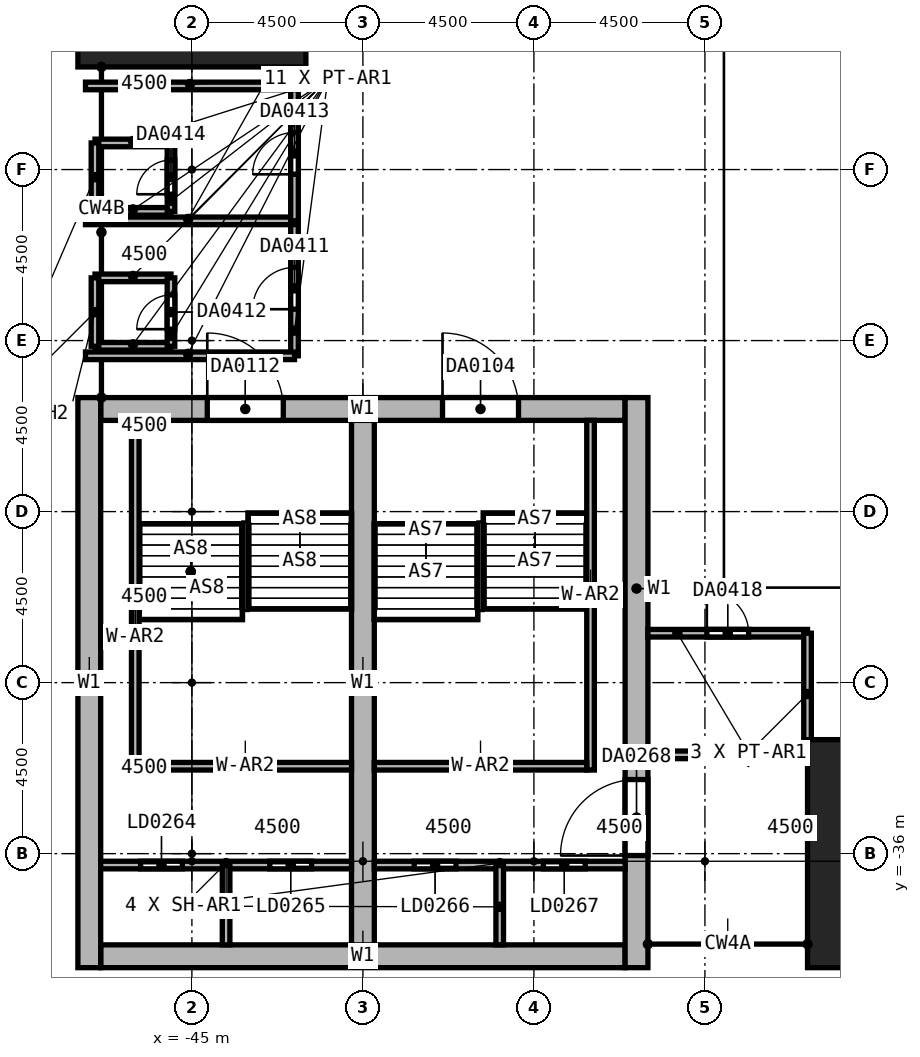
"""IFC4 building model, lengths in metres.
Left out: names, types, materials, properties, quantities, classifications, styles, units other than length and angle.
Written with IfcOpenShell. Run it as: python <this file> out.ifc"""

import sys

from ifc_helpers import new_model, si_unit, direction, frame, frame_2d, origin, origin_2d, place, context, subcontext, project, spatial, rectangle, extrude, element, fill, save


model = new_model("IFC4")
c1 = context("Model", 3, precision=1e-05, world=origin(), true_north=direction((0.0, 1.0)))
c2 = subcontext(c1, "Body", "Model", "MODEL_VIEW")
j1 = project(units=[si_unit("LENGTHUNIT", "METRE"), si_unit("PLANEANGLEUNIT", "RADIAN")], contexts=[c1])
p1 = place(None, origin())
s1 = spatial("IfcSite", under=j1, at=p1, CompositionType="ELEMENT")
p2 = place(p1, origin())
s2 = spatial("IfcBuilding", under=s1, at=p2, CompositionType="ELEMENT")
p3 = place(p2, frame((0.0, 0.0, 25.0)))
s3 = spatial("IfcBuildingStorey", under=s2, at=p3, CompositionType="ELEMENT", Elevation=25.0)
for number, where, z_axis, x_axis in (
    (1, (-27.0, -36.0, 0.0), (0.0, 0.0, 1.0), (1.0, 0.0, 0.0)),
    (2, (-45.0, -13.5, 0.0), (0.0, 0.0, 1.0), (0.0, 1.0, 0.0)),
):
    element("IfcColumn", number, at=place(p3, frame(where, z_axis=z_axis, x_axis=x_axis)), inside=s3, PredefinedType="COLUMN", context=c2, shape_type="SweptSolid", body=[
        extrude(rectangle(XDim=3.6, YDim=6.0, at=origin_2d()), origin(), (0.0, 0.0, 1.0), 6.0),
    ])
p4 = place(p3, frame((-47.4, -24.3, 0.0), z_axis=(0.0, 0.0, 1.0), x_axis=(1.0, 0.0, 0.0)))
e3 = element("IfcWall", 3, at=p4, inside=s3, PredefinedType="SHEAR", context=c2, shape_type="SweptSolid", body=[
    extrude(rectangle(XDim=13.8, YDim=0.6, at=frame_2d((6.9, 0.0))), origin(), (0.0, 0.0, 1.0), 6.0),
])
p5 = place(p4, frame((8.995, 0.0, 0.0)))
e4 = element("IfcOpeningElement", 4, at=p5, cuts=e3, PredefinedType="OPENING", context=c2, shape_type="SweptSolid", body=[
    extrude(rectangle(XDim=2.0, YDim=2.4, at=frame_2d((1.0, 1.2))), frame((0.0, 0.3, 0.0), z_axis=(0.0, -1.0, 0.0), x_axis=(1.0, 0.0, 0.0)), (0.0, 0.0, 1.0), 0.6),
])
p6 = place(p4, frame((2.805, 0.0, 0.0)))
e5 = element("IfcOpeningElement", 5, at=p6, cuts=e3, PredefinedType="OPENING", context=c2, shape_type="SweptSolid", body=[
    extrude(rectangle(XDim=2.0, YDim=2.4, at=frame_2d((1.0, 1.2))), frame((0.0, 0.3, 0.0), z_axis=(0.0, -1.0, 0.0), x_axis=(1.0, 0.0, 0.0)), (0.0, 0.0, 1.0), 0.6),
])
p7 = place(p3, frame((-47.4, -38.7, 0.0), z_axis=(0.0, 0.0, 1.0), x_axis=(1.0, 0.0, 0.0)))
e6 = element("IfcWall", 6, at=p7, inside=s3, PredefinedType="SHEAR", context=c2, shape_type="SweptSolid", body=[
    extrude(rectangle(XDim=13.8, YDim=0.6, at=frame_2d((6.9, 0.0))), origin(), (0.0, 0.0, 1.0), 6.0),
])
p8 = place(p3, frame((-47.7, -39.0, 0.0), z_axis=(0.0, 0.0, 1.0), x_axis=(0.0, 1.0, 0.0)))
e7 = element("IfcWall", 7, at=p8, inside=s3, PredefinedType="SHEAR", context=c2, shape_type="SweptSolid", body=[
    extrude(rectangle(XDim=15.0, YDim=0.6, at=frame_2d((7.5, 0.0))), origin(), (0.0, 0.0, 1.0), 6.0),
])
p9 = place(p3, frame((-33.3, -39.0, 0.0), z_axis=(0.0, 0.0, 1.0), x_axis=(0.0, 1.0, 0.0)))
e8 = element("IfcWall", 8, at=p9, inside=s3, PredefinedType="SHEAR", context=c2, shape_type="SweptSolid", body=[
    extrude(rectangle(XDim=15.0, YDim=0.6, at=frame_2d((7.5, 0.0))), origin(), (0.0, 0.0, 1.0), 6.0),
])
p10 = place(p9, frame((2.95, 0.0, 0.0)))
e9 = element("IfcOpeningElement", 9, at=p10, cuts=e8, PredefinedType="OPENING", context=c2, shape_type="SweptSolid", body=[
    extrude(rectangle(XDim=2.0, YDim=2.4, at=frame_2d((1.0, 1.2))), frame((0.0, 0.3, 0.0), z_axis=(0.0, -1.0, 0.0), x_axis=(1.0, 0.0, 0.0)), (0.0, 0.0, 1.0), 0.6),
])
p11 = place(p3, frame((-40.5, -38.4, 0.0), z_axis=(0.0, 0.0, 1.0), x_axis=(0.0, 1.0, 0.0)))
e10 = element("IfcWall", 10, at=p11, inside=s3, PredefinedType="SHEAR", context=c2, shape_type="SweptSolid", body=[
    extrude(rectangle(XDim=13.8, YDim=0.6, at=frame_2d((6.9, 0.0))), origin(), (0.0, 0.0, 1.0), 6.0),
])
p12 = place(p3, frame((-34.51, -33.8, 0.0), z_axis=(0.0, 0.0, 1.0), x_axis=(0.0, 1.0, 0.0)))
e11 = element("IfcWall", 11, at=p12, inside=s3, PredefinedType="SOLIDWALL", context=c2, shape_type="SweptSolid", body=[
    extrude(rectangle(XDim=9.2, YDim=0.2, at=frame_2d((4.6, 0.0))), origin(), (0.0, 0.0, 1.0), 6.0),
])
p13 = place(p3, frame((-40.2, -33.7, 0.0), z_axis=(0.0, 0.0, 1.0), x_axis=(1.0, 0.0, 0.0)))
e12 = element("IfcWall", 12, at=p13, inside=s3, PredefinedType="SOLIDWALL", context=c2, shape_type="SweptSolid", body=[
    extrude(rectangle(XDim=5.59, YDim=0.2, at=frame_2d((2.795, 0.0))), origin(), (0.0, 0.0, 1.0), 6.0),
])
p14 = place(p3, frame((-46.49, -33.8, 0.0), z_axis=(0.0, 0.0, 1.0), x_axis=(0.0, 1.0, 0.0)))
e13 = element("IfcWall", 13, at=p14, inside=s3, PredefinedType="SOLIDWALL", context=c2, shape_type="SweptSolid", body=[
    extrude(rectangle(XDim=9.2, YDim=0.2, at=frame_2d((4.6, 0.0))), origin(), (0.0, 0.0, 1.0), 6.0),
])
p15 = place(p3, frame((-46.39, -33.7, 0.0), z_axis=(0.0, 0.0, 1.0), x_axis=(1.0, 0.0, 0.0)))
e14 = element("IfcWall", 14, at=p15, inside=s3, PredefinedType="SOLIDWALL", context=c2, shape_type="SweptSolid", body=[
    extrude(rectangle(XDim=5.59, YDim=0.2, at=frame_2d((2.795, 0.0))), origin(), (0.0, 0.0, 1.0), 6.0),
])
p16 = place(p3, frame((-47.4, -36.3, 0.0), z_axis=(0.0, 0.0, 1.0), x_axis=(1.0, 0.0, 0.0)))
e15 = element("IfcWall", 15, at=p16, inside=s3, PredefinedType="SHEAR", context=c2, shape_type="SweptSolid", body=[
    extrude(rectangle(XDim=6.6, YDim=0.2, at=frame_2d((3.3, 0.0))), origin(), (0.0, 0.0, 1.0), 6.0),
])
p17 = place(p16, frame((1.05, 0.0, 0.0)))
e16 = element("IfcOpeningElement", 16, at=p17, cuts=e15, PredefinedType="OPENING", context=c2, shape_type="SweptSolid", body=[
    extrude(rectangle(XDim=1.1, YDim=2.4, at=frame_2d((0.55, 1.2))), frame((0.0, 0.1, 0.0), z_axis=(0.0, -1.0, 0.0), x_axis=(1.0, 0.0, 0.0)), (0.0, 0.0, 1.0), 0.2),
])
p18 = place(p16, frame((4.45, 0.0, 0.0)))
e17 = element("IfcOpeningElement", 17, at=p18, cuts=e15, PredefinedType="OPENING", context=c2, shape_type="SweptSolid", body=[
    extrude(rectangle(XDim=1.1, YDim=2.4, at=frame_2d((0.55, 1.2))), frame((0.0, 0.1, 0.0), z_axis=(0.0, -1.0, 0.0), x_axis=(1.0, 0.0, 0.0)), (0.0, 0.0, 1.0), 0.2),
])
p19 = place(p3, frame((-40.2, -36.3, 0.0), z_axis=(0.0, 0.0, 1.0), x_axis=(1.0, 0.0, 0.0)))
e18 = element("IfcWall", 18, at=p19, inside=s3, PredefinedType="SHEAR", context=c2, shape_type="SweptSolid", body=[
    extrude(rectangle(XDim=6.6, YDim=0.2, at=frame_2d((3.3, 0.0))), origin(), (0.0, 0.0, 1.0), 6.0),
])
p20 = place(p19, frame((1.05, 0.0, 0.0)))
e19 = element("IfcOpeningElement", 19, at=p20, cuts=e18, PredefinedType="OPENING", context=c2, shape_type="SweptSolid", body=[
    extrude(rectangle(XDim=1.1, YDim=2.4, at=frame_2d((0.55, 1.2))), frame((0.0, 0.1, 0.0), z_axis=(0.0, -1.0, 0.0), x_axis=(1.0, 0.0, 0.0)), (0.0, 0.0, 1.0), 0.2),
])
p21 = place(p19, frame((4.45, 0.0, 0.0)))
e20 = element("IfcOpeningElement", 20, at=p21, cuts=e18, PredefinedType="OPENING", context=c2, shape_type="SweptSolid", body=[
    extrude(rectangle(XDim=1.1, YDim=2.4, at=frame_2d((0.55, 1.2))), frame((0.0, 0.1, 0.0), z_axis=(0.0, -1.0, 0.0), x_axis=(1.0, 0.0, 0.0)), (0.0, 0.0, 1.0), 0.2),
])
for number, where, z_axis, x_axis in (
    (21, (-36.9, -38.4, 0.0), (0.0, 0.0, 1.0), (0.0, 1.0, 0.0)),
    (22, (-44.1, -38.4, 0.0), (0.0, 0.0, 1.0), (0.0, 1.0, 0.0)),
):
    element("IfcWall", number, at=place(p3, frame(where, z_axis=z_axis, x_axis=x_axis)), inside=s3, PredefinedType="SHEAR", context=c2, shape_type="SweptSolid", body=[
        extrude(rectangle(XDim=2.1, YDim=0.2, at=frame_2d((1.05, 0.0))), origin(), (0.0, 0.0, 1.0), 6.0),
    ])
p22 = place(p3, frame((-42.3, -22.9, 0.0), z_axis=(0.0, 0.0, 1.0), x_axis=(0.0, 1.0, 0.0)))
e23 = element("IfcWall", 23, at=p22, inside=s3, PredefinedType="PARTITIONING", context=c2, shape_type="SweptSolid", body=[
    extrude(rectangle(XDim=3.55, YDim=0.2, at=frame_2d((1.775, 0.0))), origin(), (0.0, 0.0, 1.0), 5.7),
])
p23 = place(p22, frame((1.225, 0.0, 0.0)))
e24 = element("IfcOpeningElement", 24, at=p23, cuts=e23, PredefinedType="OPENING", context=c2, shape_type="SweptSolid", body=[
    extrude(rectangle(XDim=1.1, YDim=2.4, at=frame_2d((0.55, 1.2))), frame((0.0, 0.1, 0.0), z_axis=(0.0, -1.0, 0.0), x_axis=(1.0, 0.0, 0.0)), (0.0, 0.0, 1.0), 0.2),
])
for number, where, z_axis, x_axis in (
    (25, (-42.3, -22.9, 0.0), (0.0, 0.0, 1.0), (-1.0, 0.0, 0.0)),
    (26, (-47.8, -19.35, 0.0), (0.0, 0.0, 1.0), (1.0, 0.0, 0.0)),
):
    element("IfcWall", number, at=place(p3, frame(where, z_axis=z_axis, x_axis=x_axis)), inside=s3, PredefinedType="PARTITIONING", context=c2, shape_type="SweptSolid", body=[
        extrude(rectangle(XDim=5.5, YDim=0.2, at=frame_2d((2.75, 0.0))), origin(), (0.0, 0.0, 1.0), 5.7),
    ])
for number, where, z_axis, x_axis in (
    (27, (-47.55, -22.65, 0.0), (0.0, 0.0, 1.0), (1.0, 0.0, 0.0)),
    (28, (-45.55, -20.85, 0.0), (0.0, 0.0, 1.0), (-1.0, 0.0, 0.0)),
):
    element("IfcWall", number, at=place(p3, frame(where, z_axis=z_axis, x_axis=x_axis)), inside=s3, PredefinedType="PARTITIONING", context=c2, shape_type="SweptSolid", body=[
        extrude(rectangle(XDim=2.0, YDim=0.2, at=frame_2d((1.0, 0.0))), origin(), (0.0, 0.0, 1.0), 5.7),
    ])
p24 = place(p3, frame((-47.55, -22.65, 0.0), z_axis=(0.0, 0.0, 1.0), x_axis=(0.0, 1.0, 0.0)))
e29 = element("IfcWall", 29, at=p24, inside=s3, PredefinedType="PARTITIONING", context=c2, shape_type="SweptSolid", body=[
    extrude(rectangle(XDim=1.8, YDim=0.2, at=frame_2d((0.9, 0.0))), origin(), (0.0, 0.0, 1.0), 4.5),
])
p25 = place(p3, frame((-45.55, -22.65, 0.0), z_axis=(0.0, 0.0, 1.0), x_axis=(0.0, 1.0, 0.0)))
e30 = element("IfcWall", 30, at=p25, inside=s3, PredefinedType="PARTITIONING", context=c2, shape_type="SweptSolid", body=[
    extrude(rectangle(XDim=1.8, YDim=0.2, at=frame_2d((0.9, 0.0))), origin(), (0.0, 0.0, 1.0), 5.7),
])
p26 = place(p25, frame((0.45, 0.0, 0.0)))
e31 = element("IfcOpeningElement", 31, at=p26, cuts=e30, PredefinedType="OPENING", context=c2, shape_type="SweptSolid", body=[
    extrude(rectangle(XDim=0.9, YDim=2.1, at=frame_2d((0.45, 1.05))), frame((0.0, 0.1, 0.0), z_axis=(0.0, -1.0, 0.0), x_axis=(1.0, 0.0, 0.0)), (0.0, 0.0, 1.0), 0.2),
])
p27 = place(p3, frame((-42.3, -19.35, 0.0), z_axis=(0.0, 0.0, 1.0), x_axis=(0.0, 1.0, 0.0)))
e32 = element("IfcWall", 32, at=p27, inside=s3, PredefinedType="PARTITIONING", context=c2, shape_type="SweptSolid", body=[
    extrude(rectangle(XDim=3.55, YDim=0.2, at=frame_2d((1.775, 0.0))), origin(), (0.0, 0.0, 1.0), 5.7),
])
p28 = place(p27, frame((1.225, 0.0, 0.0)))
e33 = element("IfcOpeningElement", 33, at=p28, cuts=e32, PredefinedType="OPENING", context=c2, shape_type="SweptSolid", body=[
    extrude(rectangle(XDim=1.1, YDim=2.4, at=frame_2d((0.55, 1.2))), frame((0.0, 0.1, 0.0), z_axis=(0.0, -1.0, 0.0), x_axis=(1.0, 0.0, 0.0)), (0.0, 0.0, 1.0), 0.2),
])
p29 = place(p3, frame((-42.3, -15.8, 0.0), z_axis=(0.0, 0.0, 1.0), x_axis=(-1.0, 0.0, 0.0)))
e34 = element("IfcWall", 34, at=p29, inside=s3, PredefinedType="PARTITIONING", context=c2, shape_type="SweptSolid", body=[
    extrude(rectangle(XDim=5.5, YDim=0.2, at=frame_2d((2.75, 0.0))), origin(), (0.0, 0.0, 1.0), 5.7),
])
for number, where, z_axis, x_axis in (
    (35, (-47.55, -19.1, 0.0), (0.0, 0.0, 1.0), (1.0, 0.0, 0.0)),
    (36, (-45.55, -17.3, 0.0), (0.0, 0.0, 1.0), (-1.0, 0.0, 0.0)),
):
    element("IfcWall", number, at=place(p3, frame(where, z_axis=z_axis, x_axis=x_axis)), inside=s3, PredefinedType="PARTITIONING", context=c2, shape_type="SweptSolid", body=[
        extrude(rectangle(XDim=2.0, YDim=0.2, at=frame_2d((1.0, 0.0))), origin(), (0.0, 0.0, 1.0), 5.7),
    ])
p30 = place(p3, frame((-47.55, -19.1, 0.0), z_axis=(0.0, 0.0, 1.0), x_axis=(0.0, 1.0, 0.0)))
e37 = element("IfcWall", 37, at=p30, inside=s3, PredefinedType="PARTITIONING", context=c2, shape_type="SweptSolid", body=[
    extrude(rectangle(XDim=1.8, YDim=0.2, at=frame_2d((0.9, 0.0))), origin(), (0.0, 0.0, 1.0), 4.5),
])
p31 = place(p3, frame((-45.55, -19.1, 0.0), z_axis=(0.0, 0.0, 1.0), x_axis=(0.0, 1.0, 0.0)))
e38 = element("IfcWall", 38, at=p31, inside=s3, PredefinedType="PARTITIONING", context=c2, shape_type="SweptSolid", body=[
    extrude(rectangle(XDim=1.8, YDim=0.2, at=frame_2d((0.9, 0.0))), origin(), (0.0, 0.0, 1.0), 5.7),
])
p32 = place(p31, frame((0.45, 0.0, 0.0)))
e39 = element("IfcOpeningElement", 39, at=p32, cuts=e38, PredefinedType="OPENING", context=c2, shape_type="SweptSolid", body=[
    extrude(rectangle(XDim=0.9, YDim=2.1, at=frame_2d((0.45, 1.05))), frame((0.0, 0.1, 0.0), z_axis=(0.0, -1.0, 0.0), x_axis=(1.0, 0.0, 0.0)), (0.0, 0.0, 1.0), 0.2),
])
p33 = place(p3, frame((-33.0, -30.2, 0.0), z_axis=(0.0, 0.0, 1.0), x_axis=(1.0, 0.0, 0.0)))
e40 = element("IfcWall", 40, at=p33, inside=s3, PredefinedType="PARTITIONING", context=c2, shape_type="SweptSolid", body=[
    extrude(rectangle(XDim=4.2, YDim=0.2, at=frame_2d((2.1, 0.0))), origin(), (0.0, 0.0, 1.0), 5.7),
])
p34 = place(p33, frame((1.55, 0.0, 0.0)))
e41 = element("IfcOpeningElement", 41, at=p34, cuts=e40, PredefinedType="OPENING", context=c2, shape_type="SweptSolid", body=[
    extrude(rectangle(XDim=1.1, YDim=2.4, at=frame_2d((0.55, 1.2))), frame((0.0, 0.1, 0.0), z_axis=(0.0, -1.0, 0.0), x_axis=(1.0, 0.0, 0.0)), (0.0, 0.0, 1.0), 0.2),
])
p35 = place(p3, frame((-28.8, -33.4, 0.0), z_axis=(0.0, 0.0, 1.0), x_axis=(0.0, 1.0, 0.0)))
e42 = element("IfcWall", 42, at=p35, inside=s3, PredefinedType="PARTITIONING", context=c2, shape_type="SweptSolid", body=[
    extrude(rectangle(XDim=3.2, YDim=0.2, at=frame_2d((1.6, 0.0))), origin(), (0.0, 0.0, 1.0), 5.7),
])
p36 = place(p3, frame((-33.0, -33.4, 0.0), z_axis=(0.0, 0.0, 1.0), x_axis=(1.0, 0.0, 0.0)))
e43 = element("IfcWall", 43, at=p36, inside=s3, PredefinedType="PARTITIONING", context=c2, shape_type="SweptSolid", body=[
    extrude(rectangle(XDim=4.2, YDim=0.2, at=frame_2d((2.1, 0.0))), origin(), (0.0, 0.0, 1.0), 5.7),
])
p37 = place(p5, frame((2.0, 0.0, 0.0), z_axis=(0.0, 0.0, 1.0), x_axis=(-1.0, 0.0, 0.0)))
e44 = element("IfcDoor", 44, at=p37, inside=s3, OperationType="DOUBLE_DOOR_SINGLE_SWING", PredefinedType="DOOR", context=c2, shape_type="SweptSolid", body=[
    extrude(rectangle(XDim=2.0, YDim=2.4, at=frame_2d((1.0, 1.2))), frame((0.0, 0.025, 0.0), z_axis=(0.0, -1.0, 0.0), x_axis=(1.0, 0.0, 0.0)), (0.0, 0.0, 1.0), 0.05),
])
fill(e4, e44)
p38 = place(p6, frame((2.0, 0.0, 0.0), z_axis=(0.0, 0.0, 1.0), x_axis=(-1.0, 0.0, 0.0)))
e45 = element("IfcDoor", 45, at=p38, inside=s3, OperationType="DOUBLE_DOOR_SINGLE_SWING", PredefinedType="DOOR", context=c2, shape_type="SweptSolid", body=[
    extrude(rectangle(XDim=2.0, YDim=2.4, at=frame_2d((1.0, 1.2))), frame((0.0, 0.025, 0.0), z_axis=(0.0, -1.0, 0.0), x_axis=(1.0, 0.0, 0.0)), (0.0, 0.0, 1.0), 0.05),
])
fill(e5, e45)
p39 = place(p17, frame((1.1, 0.0, 0.0), z_axis=(0.0, 0.0, 1.0), x_axis=(-1.0, 0.0, 0.0)))
e46 = element("IfcDoor", 46, at=p39, inside=s3, OperationType="DOUBLE_DOOR_SLIDING", PredefinedType="DOOR", context=c2, shape_type="SweptSolid", body=[
    extrude(rectangle(XDim=1.1, YDim=2.4, at=frame_2d((0.55, 1.2))), frame((0.0, 0.025, 0.0), z_axis=(0.0, -1.0, 0.0), x_axis=(1.0, 0.0, 0.0)), (0.0, 0.0, 1.0), 0.05),
])
fill(e16, e46)
p40 = place(p18, frame((1.1, 0.0, 0.0), z_axis=(0.0, 0.0, 1.0), x_axis=(-1.0, 0.0, 0.0)))
e47 = element("IfcDoor", 47, at=p40, inside=s3, OperationType="DOUBLE_DOOR_SLIDING", PredefinedType="DOOR", context=c2, shape_type="SweptSolid", body=[
    extrude(rectangle(XDim=1.1, YDim=2.4, at=frame_2d((0.55, 1.2))), frame((0.0, 0.025, 0.0), z_axis=(0.0, -1.0, 0.0), x_axis=(1.0, 0.0, 0.0)), (0.0, 0.0, 1.0), 0.05),
])
fill(e17, e47)
p41 = place(p20, frame((1.1, 0.0, 0.0), z_axis=(0.0, 0.0, 1.0), x_axis=(-1.0, 0.0, 0.0)))
e48 = element("IfcDoor", 48, at=p41, inside=s3, OperationType="DOUBLE_DOOR_SLIDING", PredefinedType="DOOR", context=c2, shape_type="SweptSolid", body=[
    extrude(rectangle(XDim=1.1, YDim=2.4, at=frame_2d((0.55, 1.2))), frame((0.0, 0.025, 0.0), z_axis=(0.0, -1.0, 0.0), x_axis=(1.0, 0.0, 0.0)), (0.0, 0.0, 1.0), 0.05),
])
fill(e19, e48)
p42 = place(p21, frame((1.1, 0.0, 0.0), z_axis=(0.0, 0.0, 1.0), x_axis=(-1.0, 0.0, 0.0)))
e49 = element("IfcDoor", 49, at=p42, inside=s3, OperationType="DOUBLE_DOOR_SLIDING", PredefinedType="DOOR", context=c2, shape_type="SweptSolid", body=[
    extrude(rectangle(XDim=1.1, YDim=2.4, at=frame_2d((0.55, 1.2))), frame((0.0, 0.025, 0.0), z_axis=(0.0, -1.0, 0.0), x_axis=(1.0, 0.0, 0.0)), (0.0, 0.0, 1.0), 0.05),
])
fill(e20, e49)
p43 = place(p10, origin())
e50 = element("IfcDoor", 50, at=p43, inside=s3, OperationType="DOUBLE_DOOR_SINGLE_SWING", PredefinedType="DOOR", context=c2, shape_type="SweptSolid", body=[
    extrude(rectangle(XDim=2.0, YDim=2.4, at=frame_2d((1.0, 1.2))), frame((0.0, 0.025, 0.0), z_axis=(0.0, -1.0, 0.0), x_axis=(1.0, 0.0, 0.0)), (0.0, 0.0, 1.0), 0.05),
])
fill(e9, e50)
p44 = place(p23, origin())
e51 = element("IfcDoor", 51, at=p44, inside=s3, OperationType="DOUBLE_DOOR_SINGLE_SWING", PredefinedType="DOOR", context=c2, shape_type="SweptSolid", body=[
    extrude(rectangle(XDim=1.1, YDim=2.4, at=frame_2d((0.55, 1.2))), frame((0.0, 0.025, 0.0), z_axis=(0.0, -1.0, 0.0), x_axis=(1.0, 0.0, 0.0)), (0.0, 0.0, 1.0), 0.05),
])
fill(e24, e51)
p45 = place(p26, origin())
e52 = element("IfcDoor", 52, at=p45, inside=s3, OperationType="SINGLE_SWING_LEFT", PredefinedType="DOOR", context=c2, shape_type="SweptSolid", body=[
    extrude(rectangle(XDim=0.9, YDim=2.1, at=frame_2d((0.45, 1.05))), frame((0.0, 0.025, 0.0), z_axis=(0.0, -1.0, 0.0), x_axis=(1.0, 0.0, 0.0)), (0.0, 0.0, 1.0), 0.05),
])
fill(e31, e52)
p46 = place(p28, origin())
e53 = element("IfcDoor", 53, at=p46, inside=s3, OperationType="DOUBLE_DOOR_SINGLE_SWING", PredefinedType="DOOR", context=c2, shape_type="SweptSolid", body=[
    extrude(rectangle(XDim=1.1, YDim=2.4, at=frame_2d((0.55, 1.2))), frame((0.0, 0.025, 0.0), z_axis=(0.0, -1.0, 0.0), x_axis=(1.0, 0.0, 0.0)), (0.0, 0.0, 1.0), 0.05),
])
fill(e33, e53)
p47 = place(p32, origin())
e54 = element("IfcDoor", 54, at=p47, inside=s3, OperationType="SINGLE_SWING_LEFT", PredefinedType="DOOR", context=c2, shape_type="SweptSolid", body=[
    extrude(rectangle(XDim=0.9, YDim=2.1, at=frame_2d((0.45, 1.05))), frame((0.0, 0.025, 0.0), z_axis=(0.0, -1.0, 0.0), x_axis=(1.0, 0.0, 0.0)), (0.0, 0.0, 1.0), 0.05),
])
fill(e39, e54)
p48 = place(p34, origin())
e55 = element("IfcDoor", 55, at=p48, inside=s3, OperationType="DOUBLE_DOOR_SINGLE_SWING", PredefinedType="DOOR", context=c2, shape_type="SweptSolid", body=[
    extrude(rectangle(XDim=1.1, YDim=2.4, at=frame_2d((0.55, 1.2))), frame((0.0, 0.025, 0.0), z_axis=(0.0, -1.0, 0.0), x_axis=(1.0, 0.0, 0.0)), (0.0, 0.0, 1.0), 0.05),
])
fill(e41, e55)
save(model, sys.argv[1])
